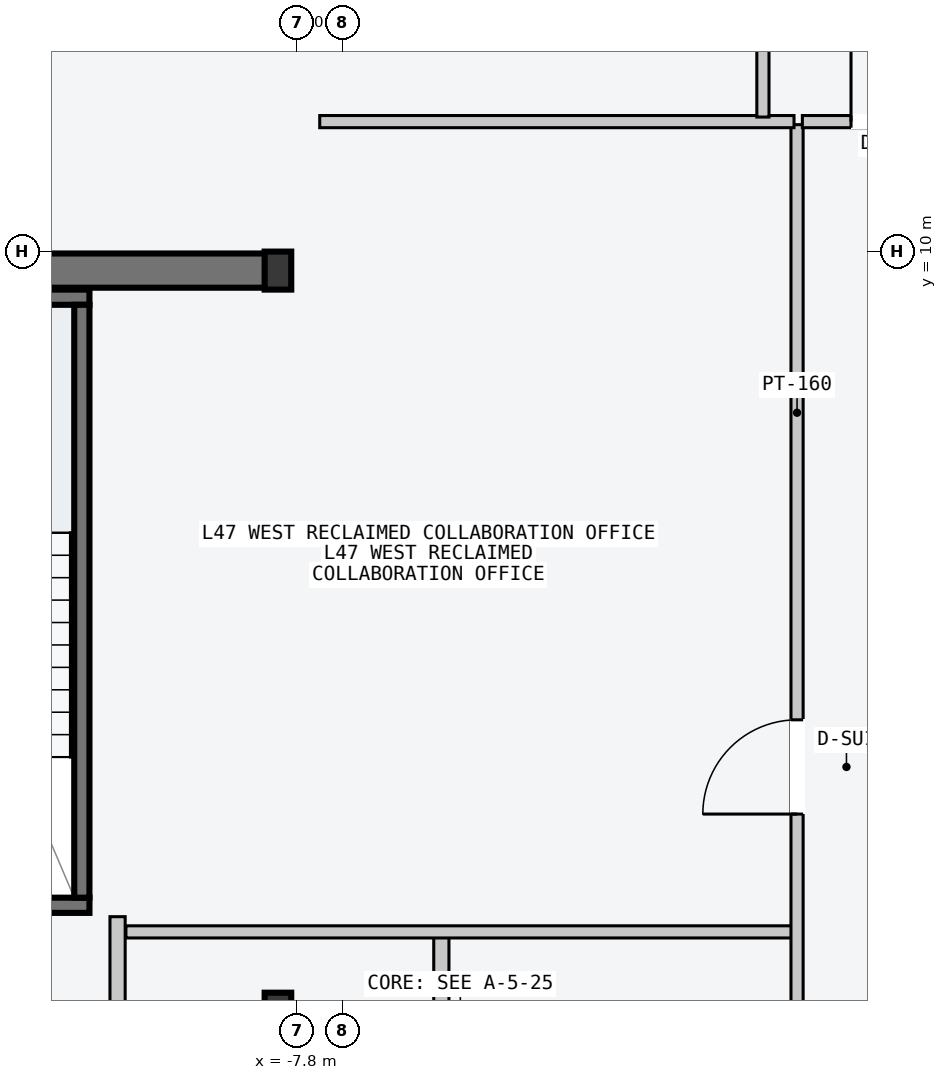
"""IFC4 building model, lengths in metres.
Left out: names, types, materials, properties, quantities, classifications, styles, units other than length and angle.
Written with IfcOpenShell. Run it as: python <this file> out.ifc"""

import sys

from ifc_helpers import new_model, si_unit, direction, frame, frame_2d, origin, origin_2d, place, context, subcontext, project, spatial, rectangle, i_section, extrude, element, fill, save


model = new_model("IFC4")
c1 = context("Model", 3, precision=1e-05, world=origin(), true_north=direction((0.0, 1.0)))
c2 = subcontext(c1, "Body", "Model", "MODEL_VIEW")
j1 = project(units=[si_unit("LENGTHUNIT", "METRE"), si_unit("PLANEANGLEUNIT", "RADIAN")], contexts=[c1])
p1 = place(None, origin())
s1 = spatial("IfcSite", under=j1, at=p1, CompositionType="ELEMENT")
p2 = place(p1, origin())
s2 = spatial("IfcBuilding", under=s1, at=p2, CompositionType="ELEMENT")
p3 = place(p2, frame((0.0, 0.0, 180.3)))
s3 = spatial("IfcBuildingStorey", under=s2, at=p3, CompositionType="ELEMENT", Elevation=180.3)
p4 = place(p3, frame((-14.53, 9.75, -0.2), z_axis=(0.0, 0.0, 1.0), x_axis=(1.0, 0.0, 0.0)))
e1 = element("IfcWall", 1, at=p4, inside=s3, PredefinedType="SHEAR", context=c2, shape_type="SweptSolid", body=[
    extrude(rectangle(XDim=6.46, YDim=0.45, at=frame_2d((3.23, 0.0))), origin(), (0.0, 0.0, 1.0), 3.6),
])
p5 = place(p3, frame((-14.25, 1.4, -0.2), z_axis=(0.0, 0.0, 1.0), x_axis=(1.0, 0.0, 0.0)))
e2 = element("IfcWall", 2, at=p5, inside=s3, PredefinedType="SOLIDWALL", context=c2, shape_type="SweptSolid", body=[
    extrude(rectangle(XDim=3.72, YDim=0.2, at=frame_2d((1.86, 0.0))), origin(), (0.0, 0.0, 1.0), 3.6),
])
p6 = place(p5, frame((1.5, 0.0, 0.2)))
e3 = element("IfcOpeningElement", 3, at=p6, cuts=e2, PredefinedType="OPENING", context=c2, shape_type="SweptSolid", body=[
    extrude(rectangle(XDim=1.12, YDim=2.18, at=frame_2d((0.56, 1.09))), frame((0.0, 0.11, 0.0), z_axis=(0.0, -1.0, 0.0), x_axis=(1.0, 0.0, 0.0)), (0.0, 0.0, 1.0), 0.22),
])
p7 = place(p3, frame((-14.25, 9.4, -0.2), z_axis=(0.0, 0.0, 1.0), x_axis=(1.0, 0.0, 0.0)))
e4 = element("IfcWall", 4, at=p7, inside=s3, PredefinedType="SOLIDWALL", context=c2, shape_type="SweptSolid", body=[
    extrude(rectangle(XDim=3.72, YDim=0.2, at=frame_2d((1.86, 0.0))), origin(), (0.0, 0.0, 1.0), 3.6),
])
p8 = place(p3, frame((-10.63, 1.5, -0.2), z_axis=(0.0, 0.0, 1.0), x_axis=(0.0, 1.0, 0.0)))
e5 = element("IfcWall", 5, at=p8, inside=s3, PredefinedType="SOLIDWALL", context=c2, shape_type="SweptSolid", body=[
    extrude(rectangle(XDim=7.8, YDim=0.2, at=frame_2d((3.9, 0.0))), origin(), (0.0, 0.0, 1.0), 3.6),
])
for number, where, z_axis, x_axis in (
    (6, (-8.05, 0.0, 0.0), (0.0, 0.0, 1.0), (1.0, 0.0, 0.0)),
    (7, (-8.05, 9.75, 0.0), (0.0, 0.0, 1.0), (1.0, 0.0, 0.0)),
):
    element("IfcColumn", number, at=place(p3, frame(where, z_axis=z_axis, x_axis=x_axis)), inside=s3, PredefinedType="COLUMN", context=c2, shape_type="SweptSolid", body=[
        extrude(i_section(OverallWidth=0.35, OverallDepth=0.5, WebThickness=0.02, FlangeThickness=0.032, at=origin_2d()), origin(), (0.0, 0.0, 1.0), 3.6),
    ])
p9 = place(p3, frame((-5.9, -9.45, 0.0), z_axis=(0.0, 0.0, 1.0), x_axis=(0.0, 1.0, 0.0)))
e8 = element("IfcWall", 8, at=p9, inside=s3, PredefinedType="PARTITIONING", context=c2, shape_type="SweptSolid", body=[
    extrude(rectangle(XDim=10.5, YDim=0.2, at=frame_2d((5.25, 0.0))), origin(), (0.0, 0.0, 1.0), 3.4),
])
p10 = place(p9, frame((3.9, 0.0, 0.0)))
e9 = element("IfcOpeningElement", 9, at=p10, cuts=e8, PredefinedType="OPENING", context=c2, shape_type="SweptSolid", body=[
    extrude(rectangle(XDim=1.5, YDim=2.2, at=frame_2d((0.75, 1.1))), frame((0.0, 0.11, 0.0), z_axis=(0.0, -1.0, 0.0), x_axis=(1.0, 0.0, 0.0)), (0.0, 0.0, 1.0), 0.22),
])
p11 = place(p3, frame((-10.16, -2.55, 0.0), z_axis=(0.0, 0.0, 1.0), x_axis=(0.0, 1.0, 0.0)))
e10 = element("IfcWall", 10, at=p11, inside=s3, PredefinedType="PARTITIONING", context=c2, shape_type="SweptSolid", body=[
    extrude(rectangle(XDim=3.8, YDim=0.2, at=frame_2d((1.9, 0.0))), origin(), (0.0, 0.0, 1.0), 3.4),
])
p12 = place(p11, frame((1.3, 0.0, 0.0)))
e11 = element("IfcOpeningElement", 11, at=p12, cuts=e10, PredefinedType="OPENING", context=c2, shape_type="SweptSolid", body=[
    extrude(rectangle(XDim=1.1, YDim=2.15, at=frame_2d((0.55, 1.075))), frame((0.0, 0.11, 0.0), z_axis=(0.0, -1.0, 0.0), x_axis=(1.0, 0.0, 0.0)), (0.0, 0.0, 1.0), 0.22),
])
p13 = place(p3, frame((-10.05, 1.05, 0.0), z_axis=(0.0, 0.0, 1.0), x_axis=(1.0, 0.0, 0.0)))
e12 = element("IfcWall", 12, at=p13, inside=s3, PredefinedType="PARTITIONING", context=c2, shape_type="SweptSolid", body=[
    extrude(rectangle(XDim=8.79, YDim=0.16, at=frame_2d((4.395, 0.0))), origin(), (0.0, 0.0, 1.0), 3.4),
])
p14 = place(p3, frame((-1.22, -3.5, 0.0), z_axis=(0.0, 0.0, 1.0), x_axis=(0.0, 1.0, 0.0)))
e13 = element("IfcWall", 13, at=p14, inside=s3, PredefinedType="PARTITIONING", context=c2, shape_type="SweptSolid", body=[
    extrude(rectangle(XDim=15.17, YDim=0.16, at=frame_2d((7.585, 0.0))), origin(), (0.0, 0.0, 1.0), 3.4),
])
p15 = place(p14, frame((6.1, 0.0, 0.0)))
e14 = element("IfcOpeningElement", 14, at=p15, cuts=e13, PredefinedType="OPENING", context=c2, shape_type="SweptSolid", body=[
    extrude(rectangle(XDim=1.24, YDim=2.24, at=frame_2d((0.62, 1.12))), frame((0.0, 0.09, 0.0), z_axis=(0.0, -1.0, 0.0), x_axis=(1.0, 0.0, 0.0)), (0.0, 0.0, 1.0), 0.18),
])
p16 = place(p14, frame((1.6, 0.0, 0.0)))
e15 = element("IfcOpeningElement", 15, at=p16, cuts=e13, PredefinedType="OPENING", context=c2, shape_type="SweptSolid", body=[
    extrude(rectangle(XDim=0.96, YDim=2.18, at=frame_2d((0.48, 1.09))), frame((0.0, 0.09, 0.0), z_axis=(0.0, -1.0, 0.0), x_axis=(1.0, 0.0, 0.0)), (0.0, 0.0, 1.0), 0.18),
])
p17 = place(p3, frame((-7.5, 11.71, 0.0), z_axis=(0.0, 0.0, 1.0), x_axis=(1.0, 0.0, 0.0)))
e16 = element("IfcWall", 16, at=p17, inside=s3, PredefinedType="PARTITIONING", context=c2, shape_type="SweptSolid", body=[
    extrude(rectangle(XDim=6.24, YDim=0.16, at=frame_2d((3.12, 0.0))), origin(), (0.0, 0.0, 1.0), 3.4),
])
p18 = place(p3, frame((-1.669, 11.77, 0.0), z_axis=(0.0, 0.0, 1.0), x_axis=(0.0, 1.0, 0.0)))
e17 = element("IfcWall", 17, at=p18, inside=s3, PredefinedType="PARTITIONING", context=c2, shape_type="SweptSolid", body=[
    extrude(rectangle(XDim=6.79, YDim=0.16, at=frame_2d((3.395, 0.0))), origin(), (0.0, 0.0, 1.0), 3.4),
])
p19 = place(p18, frame((1.15, 0.0, 0.0)))
e18 = element("IfcOpeningElement", 18, at=p19, cuts=e17, PredefinedType="OPENING", context=c2, shape_type="SweptSolid", body=[
    extrude(rectangle(XDim=0.96, YDim=2.18, at=frame_2d((0.48, 1.09))), frame((0.0, 0.09, 0.0), z_axis=(0.0, -1.0, 0.0), x_axis=(1.0, 0.0, 0.0)), (0.0, 0.0, 1.0), 0.18),
])
p20 = place(p3, frame((-1.15, 11.71, 0.0), z_axis=(0.0, 0.0, 1.0), x_axis=(1.0, 0.0, 0.0)))
e19 = element("IfcWall", 19, at=p20, inside=s3, PredefinedType="PARTITIONING", context=c2, shape_type="SweptSolid", body=[
    extrude(rectangle(XDim=2.3, YDim=0.16, at=frame_2d((1.15, 0.0))), origin(), (0.0, 0.0, 1.0), 3.4),
])
p21 = place(p20, frame((0.64, 0.0, 0.0)))
e20 = element("IfcOpeningElement", 20, at=p21, cuts=e19, PredefinedType="OPENING", context=c2, shape_type="SweptSolid", body=[
    extrude(rectangle(XDim=1.02, YDim=2.2, at=frame_2d((0.51, 1.1))), frame((0.0, 0.09, 0.0), z_axis=(0.0, -1.0, 0.0), x_axis=(1.0, 0.0, 0.0)), (0.0, 0.0, 1.0), 0.18),
])
p22 = place(p15, origin())
e21 = element("IfcDoor", 21, at=p22, inside=s3, OperationType="SINGLE_SWING_LEFT", PredefinedType="DOOR", context=c2, shape_type="SweptSolid", body=[
    extrude(rectangle(XDim=1.24, YDim=2.24, at=frame_2d((0.62, 1.12))), frame((0.0, 0.025, 0.0), z_axis=(0.0, -1.0, 0.0), x_axis=(1.0, 0.0, 0.0)), (0.0, 0.0, 1.0), 0.05),
])
fill(e14, e21)
p23 = place(p21, origin())
e22 = element("IfcDoor", 22, at=p23, inside=s3, OperationType="SINGLE_SWING_LEFT", PredefinedType="DOOR", context=c2, shape_type="SweptSolid", body=[
    extrude(rectangle(XDim=1.02, YDim=2.2, at=frame_2d((0.51, 1.1))), frame((0.0, 0.025, 0.0), z_axis=(0.0, -1.0, 0.0), x_axis=(1.0, 0.0, 0.0)), (0.0, 0.0, 1.0), 0.05),
])
fill(e20, e22)
save(model, sys.argv[1])
